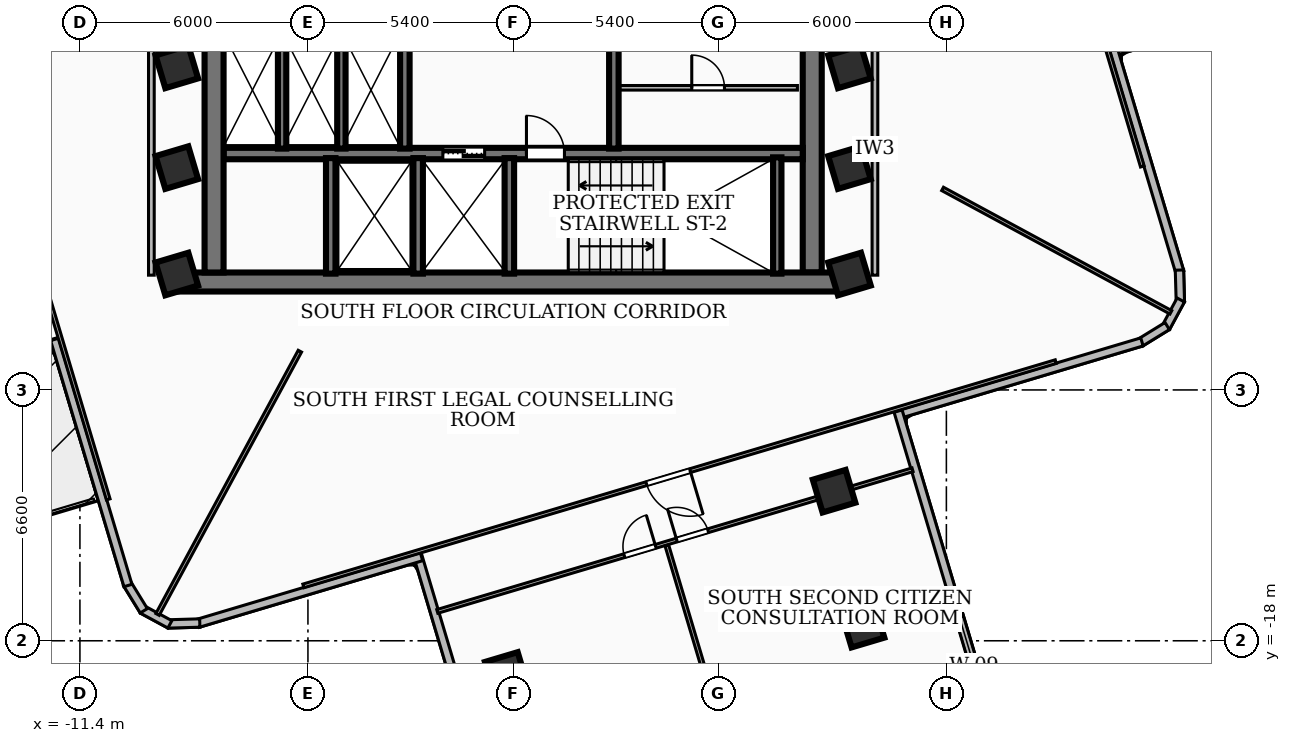
"""IFC4 building model, lengths in metres.
Left out: names, types, materials, properties, quantities, classifications, styles, units other than length and angle.
Written with IfcOpenShell. Run it as: python <this file> out.ifc"""

import sys

from ifc_helpers import new_model, si_unit, direction, frame, frame_2d, origin, origin_2d, place, context, subcontext, project, spatial, rectangle, extrude, element, fill, save


model = new_model("IFC4")
c1 = context("Model", 3, precision=1e-05, world=origin(), true_north=direction((0.0, 1.0)))
c2 = subcontext(c1, "Body", "Model", "MODEL_VIEW")
j1 = project(units=[si_unit("LENGTHUNIT", "METRE"), si_unit("PLANEANGLEUNIT", "RADIAN")], contexts=[c1])
p1 = place(None, origin())
s1 = spatial("IfcSite", under=j1, at=p1, CompositionType="ELEMENT")
p2 = place(p1, origin())
s2 = spatial("IfcBuilding", under=s1, at=p2, CompositionType="ELEMENT")
p3 = place(p2, frame((0.0, 0.0, 141.48)))
s3 = spatial("IfcBuildingStorey", under=s2, at=p3, CompositionType="ELEMENT", Elevation=141.48)
p4 = place(p3, frame((8.78, -8.56, 0.0), z_axis=(0.0, 0.0, 1.0), x_axis=(-1.0, 0.0, 0.0)))
e1 = element("IfcWall", 1, at=p4, inside=s3, PredefinedType="SHEAR", context=c2, shape_type="SweptSolid", body=[
    extrude(rectangle(XDim=17.56, YDim=0.5, at=frame_2d((8.78, 0.0))), origin(), (0.0, 0.0, 1.0), 3.32),
])
for number, where, z_axis, x_axis in (
    (2, (-7.87, -8.31, 0.0), (0.0, 0.0, 1.0), (0.0, 1.0, 0.0)),
    (3, (7.87, -2.0, 0.0), (0.0, 0.0, 1.0), (0.0, -1.0, 0.0)),
):
    element("IfcWall", number, at=place(p3, frame(where, z_axis=z_axis, x_axis=x_axis)), inside=s3, PredefinedType="SHEAR", context=c2, shape_type="SweptSolid", body=[
        extrude(rectangle(XDim=6.31, YDim=0.5, at=frame_2d((3.155, 0.0))), origin(), (0.0, 0.0, 1.0), 3.32),
    ])
p5 = place(p3, frame((-7.62, -5.18, 0.0), z_axis=(0.0, 0.0, 1.0), x_axis=(1.0, 0.0, 0.0)))
e4 = element("IfcWall", 4, at=p5, inside=s3, PredefinedType="SOLIDWALL", context=c2, shape_type="SweptSolid", body=[
    extrude(rectangle(XDim=15.24, YDim=0.3, at=frame_2d((7.62, 0.0))), origin(), (0.0, 0.0, 1.0), 3.32),
])
p6 = place(p5, frame((5.77, 0.0, 0.0)))
e5 = element("IfcOpeningElement", 5, at=p6, cuts=e4, PredefinedType="OPENING", context=c2, shape_type="SweptSolid", body=[
    extrude(rectangle(XDim=1.1, YDim=2.15, at=frame_2d((0.55, 1.075))), frame((0.0, 0.16, 0.0), z_axis=(0.0, -1.0, 0.0), x_axis=(1.0, 0.0, 0.0)), (0.0, 0.0, 1.0), 0.32),
])
p7 = place(p5, frame((7.97, 0.0, 0.0)))
e6 = element("IfcOpeningElement", 6, at=p7, cuts=e4, PredefinedType="OPENING", context=c2, shape_type="SweptSolid", body=[
    extrude(rectangle(XDim=1.0, YDim=2.1, at=frame_2d((0.5, 1.05))), frame((0.0, 0.16, 0.0), z_axis=(0.0, -1.0, 0.0), x_axis=(1.0, 0.0, 0.0)), (0.0, 0.0, 1.0), 0.32),
])
p8 = place(p3, frame((6.95, -8.34, 0.0), z_axis=(0.0, 0.0, 1.0), x_axis=(0.0, 1.0, 0.0)))
e7 = element("IfcWall", 7, at=p8, inside=s3, PredefinedType="SOLIDWALL", context=c2, shape_type="SweptSolid", body=[
    extrude(rectangle(XDim=3.06, YDim=0.22, at=frame_2d((1.53, 0.0))), origin(), (0.0, 0.0, 1.0), 3.32),
])
for number, where, z_axis, x_axis in (
    (8, (-0.1, -8.34, 0.0), (0.0, 0.0, 1.0), (0.0, 1.0, 0.0)),
    (9, (-2.5, -8.34, 0.0), (0.0, 0.0, 1.0), (0.0, 1.0, 0.0)),
    (10, (-4.8, -8.34, 0.0), (0.0, 0.0, 1.0), (0.0, 1.0, 0.0)),
):
    element("IfcWall", number, at=place(p3, frame(where, z_axis=z_axis, x_axis=x_axis)), inside=s3, PredefinedType="SOLIDWALL", context=c2, shape_type="SweptSolid", body=[
        extrude(rectangle(XDim=3.04, YDim=0.25, at=frame_2d((1.52, 0.0))), origin(), (0.0, 0.0, 1.0), 3.32),
    ])
for number, where, z_axis, x_axis in (
    (11, (-2.85, -5.05, 0.0), (0.0, 0.0, 1.0), (0.0, 1.0, 0.0)),
    (12, (2.65, -5.05, 0.0), (0.0, 0.0, 1.0), (0.0, 1.0, 0.0)),
):
    element("IfcWall", number, at=place(p3, frame(where, z_axis=z_axis, x_axis=x_axis)), inside=s3, PredefinedType="SOLIDWALL", context=c2, shape_type="SweptSolid", body=[
        extrude(rectangle(XDim=3.07, YDim=0.25, at=frame_2d((1.535, 0.0))), origin(), (0.0, 0.0, 1.0), 3.32),
    ])
for number, where, z_axis, x_axis in (
    (13, (-6.08, -5.05, 0.0), (0.0, 0.0, 1.0), (0.0, 1.0, 0.0)),
    (14, (-4.52, -5.05, 0.0), (0.0, 0.0, 1.0), (0.0, 1.0, 0.0)),
):
    element("IfcWall", number, at=place(p3, frame(where, z_axis=z_axis, x_axis=x_axis)), inside=s3, PredefinedType="SOLIDWALL", context=c2, shape_type="SweptSolid", body=[
        extrude(rectangle(XDim=3.07, YDim=0.22, at=frame_2d((1.535, 0.0))), origin(), (0.0, 0.0, 1.0), 3.32),
    ])
for number, where, z_axis, x_axis in (
    (15, (-8.85, -5.55, 0.0), (0.0, 0.0, 1.0), (0.958, 0.286, 0.0)),
    (16, (-8.85, -2.9, 0.0), (0.0, 0.0, 1.0), (0.958, 0.286, 0.0)),
    (17, (8.85, -5.55, 0.0), (0.0, 0.0, 1.0), (0.958, 0.286, 0.0)),
    (18, (8.85, -2.9, 0.0), (0.0, 0.0, 1.0), (0.958, 0.286, 0.0)),
    (19, (8.85, -8.35, 0.0), (0.0, 0.0, 1.0), (0.958, 0.286, 0.0)),
    (20, (-8.85, -8.35, 0.0), (0.0, 0.0, 1.0), (0.958, 0.286, 0.0)),
    (21, (-0.183, -18.86, 0.0), (0.0, 0.0, 1.0), (0.958, 0.286, 0.0)),
    (22, (8.445, -14.064, 0.0), (0.0, 0.0, 1.0), (0.958, 0.286, 0.0)),
    (23, (9.208, -17.615, 0.0), (0.0, 0.0, 1.0), (0.958, 0.286, 0.0)),
):
    element("IfcColumn", number, at=place(p3, frame(where, z_axis=z_axis, x_axis=x_axis)), inside=s3, PredefinedType="COLUMN", context=c2, shape_type="SweptSolid", body=[
        extrude(rectangle(XDim=0.9, YDim=0.9, at=origin_2d()), origin(), (0.0, 0.0, 1.0), 3.6),
    ])
p9 = place(p3, frame((-11.957, -10.129, 0.0), z_axis=(0.0, 0.0, 1.0), x_axis=(-0.958343962332, -0.285616613419, 0.0)))
e24 = element("IfcWall", 24, at=p9, inside=s3, PredefinedType="SOLIDWALL", context=c2, shape_type="SweptSolid", body=[
    extrude(rectangle(XDim=13.458, YDim=0.22, at=frame_2d((6.729, 0.0))), origin(), (0.0, 0.0, 1.0), 2.7),
])
p10 = place(p9, frame((5.0, 0.0, 0.0)))
e25 = element("IfcOpeningElement", 25, at=p10, cuts=e24, PredefinedType="OPENING", context=c2, shape_type="SweptSolid", body=[
    extrude(rectangle(XDim=1.1, YDim=2.1, at=frame_2d((0.55, 1.05))), frame((0.0, 0.12, 0.0), z_axis=(0.0, -1.0, 0.0), x_axis=(1.0, 0.0, 0.0)), (0.0, 0.0, 1.0), 0.24),
])
p11 = place(p3, frame((28.626, 1.323, 0.0), z_axis=(0.0, 0.0, 1.0), x_axis=(-0.958343962332, -0.285616613419, 0.0)))
e26 = element("IfcWall", 26, at=p11, inside=s3, PredefinedType="SOLIDWALL", context=c2, shape_type="SweptSolid", body=[
    extrude(rectangle(XDim=13.458, YDim=0.22, at=frame_2d((6.729, 0.0))), origin(), (0.0, 0.0, 1.0), 3.32),
])
p12 = place(p11, frame((0.85, 0.0, 0.85)))
e27 = element("IfcOpeningElement", 27, at=p12, cuts=e26, PredefinedType="OPENING", context=c2, shape_type="SweptSolid", body=[
    extrude(rectangle(XDim=1.5, YDim=1.8, at=frame_2d((0.75, 0.9))), frame((0.0, 0.12, 0.0), z_axis=(0.0, -1.0, 0.0), x_axis=(1.0, 0.0, 0.0)), (0.0, 0.0, 1.0), 0.24),
])
p13 = place(p3, frame((15.787, -2.412, 0.0), z_axis=(0.0, 0.0, 1.0), x_axis=(0.285712854037, -0.958315274342, 0.0)))
e28 = element("IfcWall", 28, at=p13, inside=s3, PredefinedType="SOLIDWALL", context=c2, shape_type="SweptSolid", body=[
    extrude(rectangle(XDim=6.139, YDim=0.22, at=frame_2d((3.069, 0.0))), origin(), (0.0, 0.0, 1.0), 3.32),
])
p14 = place(p3, frame((17.533, -8.246, 0.0), z_axis=(0.0, 0.0, 1.0), x_axis=(0.028676726094, -0.999588738122, 0.0)))
e29 = element("IfcWall", 29, at=p14, inside=s3, PredefinedType="SOLIDWALL", context=c2, shape_type="SweptSolid", body=[
    extrude(rectangle(XDim=0.834, YDim=0.22, at=frame_2d((0.417, 0.0))), origin(), (0.0, 0.0, 1.0), 3.32),
])
p15 = place(p3, frame((17.568, -9.033, 0.0), z_axis=(0.0, 0.0, 1.0), x_axis=(-0.475928115507, -0.879484183411, 0.0)))
e30 = element("IfcWall", 30, at=p15, inside=s3, PredefinedType="SOLIDWALL", context=c2, shape_type="SweptSolid", body=[
    extrude(rectangle(XDim=0.82, YDim=0.22, at=frame_2d((0.41, 0.0))), origin(), (0.0, 0.0, 1.0), 3.32),
])
p16 = place(p3, frame((17.211, -9.719, 0.0), z_axis=(0.0, 0.0, 1.0), x_axis=(-0.851597982144, -0.524195456684, 0.0)))
e31 = element("IfcWall", 31, at=p16, inside=s3, PredefinedType="SOLIDWALL", context=c2, shape_type="SweptSolid", body=[
    extrude(rectangle(XDim=0.834, YDim=0.22, at=frame_2d((0.417, 0.0))), origin(), (0.0, 0.0, 1.0), 3.32),
])
p17 = place(p3, frame((16.546, -10.136, 0.0), z_axis=(0.0, 0.0, 1.0), x_axis=(-0.958346765514, -0.285607207592, 0.0)))
e32 = element("IfcWall", 32, at=p17, inside=s3, PredefinedType="SOLIDWALL", context=c2, shape_type="SweptSolid", body=[
    extrude(rectangle(XDim=6.757, YDim=0.22, at=frame_2d((3.379, 0.0))), origin(), (0.0, 0.0, 1.0), 3.32),
])
p18 = place(p3, frame((10.129, -11.957, 0.0), z_axis=(0.0, 0.0, 1.0), x_axis=(0.285599672934, -0.958349010966, 0.0)))
e33 = element("IfcWall", 33, at=p18, inside=s3, PredefinedType="SOLIDWALL", context=c2, shape_type="SweptSolid", body=[
    extrude(rectangle(XDim=9.458, YDim=0.22, at=frame_2d((4.729, 0.0))), origin(), (0.0, 0.0, 1.0), 3.32),
])
p19 = place(p18, frame((5.658, 0.0, 0.85)))
e34 = element("IfcOpeningElement", 34, at=p19, cuts=e33, PredefinedType="OPENING", context=c2, shape_type="SweptSolid", body=[
    extrude(rectangle(XDim=2.7, YDim=1.65, at=frame_2d((1.35, 0.825))), frame((0.0, 0.12, 0.0), z_axis=(0.0, -1.0, 0.0), x_axis=(1.0, 0.0, 0.0)), (0.0, 0.0, 1.0), 0.24),
])
p20 = place(p3, frame((0.18, -24.792, 0.0), z_axis=(0.0, 0.0, 1.0), x_axis=(-0.28557596478, 0.958356075966, 0.0)))
e35 = element("IfcWall", 35, at=p20, inside=s3, PredefinedType="SOLIDWALL", context=c2, shape_type="SweptSolid", body=[
    extrude(rectangle(XDim=9.458, YDim=0.22, at=frame_2d((4.729, 0.0))), origin(), (0.0, 0.0, 1.0), 2.55),
])
p21 = place(p3, frame((-2.412, -15.787, 0.0), z_axis=(0.0, 0.0, 1.0), x_axis=(-0.958315274342, -0.285712854037, 0.0)))
e36 = element("IfcWall", 36, at=p21, inside=s3, PredefinedType="SOLIDWALL", context=c2, shape_type="SweptSolid", body=[
    extrude(rectangle(XDim=6.139, YDim=0.22, at=frame_2d((3.069, 0.0))), origin(), (0.0, 0.0, 1.0), 2.55),
])
p22 = place(p3, frame((-8.246, -17.533, 0.0), z_axis=(0.0, 0.0, 1.0), x_axis=(-0.999588738122, -0.028676726094, 0.0)))
e37 = element("IfcWall", 37, at=p22, inside=s3, PredefinedType="SOLIDWALL", context=c2, shape_type="SweptSolid", body=[
    extrude(rectangle(XDim=0.834, YDim=0.22, at=frame_2d((0.417, 0.0))), origin(), (0.0, 0.0, 1.0), 3.32),
])
p23 = place(p3, frame((-9.033, -17.568, 0.0), z_axis=(0.0, 0.0, 1.0), x_axis=(-0.879484183411, 0.475928115507, 0.0)))
e38 = element("IfcWall", 38, at=p23, inside=s3, PredefinedType="SOLIDWALL", context=c2, shape_type="SweptSolid", body=[
    extrude(rectangle(XDim=0.82, YDim=0.22, at=frame_2d((0.41, 0.0))), origin(), (0.0, 0.0, 1.0), 3.32),
])
p24 = place(p3, frame((-9.719, -17.211, 0.0), z_axis=(0.0, 0.0, 1.0), x_axis=(-0.524195456684, 0.851597982144, 0.0)))
e39 = element("IfcWall", 39, at=p24, inside=s3, PredefinedType="SOLIDWALL", context=c2, shape_type="SweptSolid", body=[
    extrude(rectangle(XDim=0.834, YDim=0.22, at=frame_2d((0.417, 0.0))), origin(), (0.0, 0.0, 1.0), 3.32),
])
p25 = place(p3, frame((-10.136, -16.546, 0.0), z_axis=(0.0, 0.0, 1.0), x_axis=(-0.285607207592, 0.958346765514, 0.0)))
e40 = element("IfcWall", 40, at=p25, inside=s3, PredefinedType="SOLIDWALL", context=c2, shape_type="SweptSolid", body=[
    extrude(rectangle(XDim=6.757, YDim=0.22, at=frame_2d((3.379, 0.0))), origin(), (0.0, 0.0, 1.0), 2.7),
])
p26 = place(p3, frame((2.8, -3.45, 0.0), z_axis=(0.0, 0.0, 1.0), x_axis=(1.0, 0.0, 0.0)))
e41 = element("IfcWall", 41, at=p26, inside=s3, PredefinedType="PARTITIONING", context=c2, shape_type="SweptSolid", body=[
    extrude(rectangle(XDim=4.68, YDim=0.12, at=frame_2d((2.34, 0.0))), origin(), (0.0, 0.0, 1.0), 3.32),
])
p27 = place(p26, frame((1.9, 0.0, 0.0)))
e42 = element("IfcOpeningElement", 42, at=p27, cuts=e41, PredefinedType="OPENING", context=c2, shape_type="SweptSolid", body=[
    extrude(rectangle(XDim=0.86, YDim=2.04, at=frame_2d((0.43, 1.02))), frame((0.0, 0.07, 0.0), z_axis=(0.0, -1.0, 0.0), x_axis=(1.0, 0.0, 0.0)), (0.0, 0.0, 1.0), 0.14),
])
for number, where, z_axis, x_axis in (
    (43, (-9.52, -8.38, 0.0), (0.0, 0.0, 1.0), (0.0, 1.0, 0.0)),
    (44, (9.52, -8.38, 0.0), (0.0, 0.0, 1.0), (0.0, 1.0, 0.0)),
):
    element("IfcWall", number, at=place(p3, frame(where, z_axis=z_axis, x_axis=x_axis)), inside=s3, PredefinedType="PARTITIONING", context=c2, shape_type="SweptSolid", body=[
        extrude(rectangle(XDim=6.63, YDim=0.15, at=frame_2d((3.315, 0.0))), origin(), (0.0, 0.0, 1.0), 2.55),
    ])
p28 = place(p3, frame((-5.612, -10.38, 0.0), z_axis=(0.0, 0.0, 1.0), x_axis=(-0.475666815962, -0.879625534073, 0.0)))
e45 = element("IfcWall", 45, at=p28, inside=s3, PredefinedType="PARTITIONING", context=c2, shape_type="SweptSolid", body=[
    extrude(rectangle(XDim=7.875, YDim=0.1, at=frame_2d((3.938, 0.0))), origin(), (0.0, 0.0, 1.0), 2.55),
])
p29 = place(p3, frame((11.3, -6.11, 0.0), z_axis=(0.0, 0.0, 1.0), x_axis=(0.879653556483, -0.475614991948, 0.0)))
e46 = element("IfcWall", 46, at=p29, inside=s3, PredefinedType="PARTITIONING", context=c2, shape_type="SweptSolid", body=[
    extrude(rectangle(XDim=6.829, YDim=0.1, at=frame_2d((3.414, 0.0))), origin(), (0.0, 0.0, 1.0), 3.32),
])
p30 = place(p3, frame((10.655, 14.279, 0.0), z_axis=(0.0, 0.0, 1.0), x_axis=(0.285665949025, -0.958329257389, 0.0)))
e47 = element("IfcWall", 47, at=p30, inside=s3, PredefinedType="PARTITIONING", context=c2, shape_type="SweptSolid", body=[
    extrude(rectangle(XDim=20.66, YDim=0.1, at=frame_2d((10.33, 0.0))), origin(), (0.0, 0.0, 1.0), 2.55),
])
p31 = place(p30, frame((10.04, 0.0, 0.0)))
e48 = element("IfcOpeningElement", 48, at=p31, cuts=e47, PredefinedType="OPENING", context=c2, shape_type="SweptSolid", body=[
    extrude(rectangle(XDim=1.2, YDim=2.1, at=frame_2d((0.6, 1.05))), frame((0.0, 0.06, 0.0), z_axis=(0.0, -1.0, 0.0), x_axis=(1.0, 0.0, 0.0)), (0.0, 0.0, 1.0), 0.12),
])
p32 = place(p3, frame((-10.655, -14.279, 0.0), z_axis=(0.0, 0.0, 1.0), x_axis=(-0.285665949025, 0.958329257389, 0.0)))
e49 = element("IfcWall", 49, at=p32, inside=s3, PredefinedType="PARTITIONING", context=c2, shape_type="SweptSolid", body=[
    extrude(rectangle(XDim=20.66, YDim=0.1, at=frame_2d((10.33, 0.0))), origin(), (0.0, 0.0, 1.0), 2.55),
])
p33 = place(p32, frame((10.04, 0.0, 0.0)))
e50 = element("IfcOpeningElement", 50, at=p33, cuts=e49, PredefinedType="OPENING", context=c2, shape_type="SweptSolid", body=[
    extrude(rectangle(XDim=1.2, YDim=2.1, at=frame_2d((0.6, 1.05))), frame((0.0, 0.06, 0.0), z_axis=(0.0, -1.0, 0.0), x_axis=(1.0, 0.0, 0.0)), (0.0, 0.0, 1.0), 0.12),
])
p34 = place(p3, frame((14.279, -10.655, 0.0), z_axis=(0.0, 0.0, 1.0), x_axis=(-0.958329257389, -0.285665949025, 0.0)))
e51 = element("IfcWall", 51, at=p34, inside=s3, PredefinedType="PARTITIONING", context=c2, shape_type="SweptSolid", body=[
    extrude(rectangle(XDim=20.66, YDim=0.1, at=frame_2d((10.33, 0.0))), origin(), (0.0, 0.0, 1.0), 2.55),
])
p35 = place(p34, frame((10.04, 0.0, 0.0)))
e52 = element("IfcOpeningElement", 52, at=p35, cuts=e51, PredefinedType="OPENING", context=c2, shape_type="SweptSolid", body=[
    extrude(rectangle(XDim=1.2, YDim=2.1, at=frame_2d((0.6, 1.05))), frame((0.0, 0.06, 0.0), z_axis=(0.0, -1.0, 0.0), x_axis=(1.0, 0.0, 0.0)), (0.0, 0.0, 1.0), 0.12),
])
p36 = place(p3, frame((4.044, -15.49, 0.0), z_axis=(0.0, 0.0, 1.0), x_axis=(0.285631393534, -0.95833955727, 0.0)))
e53 = element("IfcWall", 53, at=p36, inside=s3, PredefinedType="PARTITIONING", context=c2, shape_type="SweptSolid", body=[
    extrude(rectangle(XDim=9.215, YDim=0.1, at=frame_2d((4.607, 0.0))), origin(), (0.0, 0.0, 1.0), 2.812),
])
p37 = place(p3, frame((-1.996, -17.228, 0.0), z_axis=(0.0, 0.0, 1.0), x_axis=(0.958326854981, 0.285674008308, 0.0)))
e54 = element("IfcWall", 54, at=p37, inside=s3, PredefinedType="PARTITIONING", context=c2, shape_type="SweptSolid", body=[
    extrude(rectangle(XDim=13.05, YDim=0.1, at=frame_2d((6.525, 0.0))), origin(), (0.0, 0.0, 1.0), 2.55),
])
p38 = place(p37, frame((5.135, 0.0, 0.0)))
e55 = element("IfcOpeningElement", 55, at=p38, cuts=e54, PredefinedType="OPENING", context=c2, shape_type="SweptSolid", body=[
    extrude(rectangle(XDim=0.86, YDim=2.04, at=frame_2d((0.43, 1.02))), frame((0.0, 0.06, 0.0), z_axis=(0.0, -1.0, 0.0), x_axis=(1.0, 0.0, 0.0)), (0.0, 0.0, 1.0), 0.12),
])
p39 = place(p37, frame((6.575, 0.0, 0.0)))
e56 = element("IfcOpeningElement", 56, at=p39, cuts=e54, PredefinedType="OPENING", context=c2, shape_type="SweptSolid", body=[
    extrude(rectangle(XDim=0.86, YDim=2.04, at=frame_2d((0.43, 1.02))), frame((0.0, 0.06, 0.0), z_axis=(0.0, -1.0, 0.0), x_axis=(1.0, 0.0, 0.0)), (0.0, 0.0, 1.0), 0.12),
])
p40 = place(p19, origin())
e57 = element("IfcWindow", 57, at=p40, inside=s3, PartitioningType="SINGLE_PANEL", PredefinedType="WINDOW", context=c2, shape_type="SweptSolid", body=[
    extrude(rectangle(XDim=2.7, YDim=1.65, at=frame_2d((1.35, 0.825))), frame((0.0, 0.03, 0.0), z_axis=(0.0, -1.0, 0.0), x_axis=(1.0, 0.0, 0.0)), (0.0, 0.0, 1.0), 0.06),
])
fill(e34, e57)
p41 = place(p6, origin())
e58 = element("IfcDoor", 58, at=p41, inside=s3, OperationType="DOUBLE_DOOR_SLIDING", PredefinedType="DOOR", context=c2, shape_type="SweptSolid", body=[
    extrude(rectangle(XDim=1.1, YDim=2.15, at=frame_2d((0.55, 1.075))), frame((0.0, 0.025, 0.0), z_axis=(0.0, -1.0, 0.0), x_axis=(1.0, 0.0, 0.0)), (0.0, 0.0, 1.0), 0.05),
])
fill(e5, e58)
p42 = place(p7, origin())
e59 = element("IfcDoor", 59, at=p42, inside=s3, OperationType="SINGLE_SWING_LEFT", PredefinedType="DOOR", context=c2, shape_type="SweptSolid", body=[
    extrude(rectangle(XDim=1.0, YDim=2.1, at=frame_2d((0.5, 1.05))), frame((0.0, 0.025, 0.0), z_axis=(0.0, -1.0, 0.0), x_axis=(1.0, 0.0, 0.0)), (0.0, 0.0, 1.0), 0.05),
])
fill(e6, e59)
p43 = place(p27, origin())
e60 = element("IfcDoor", 60, at=p43, inside=s3, OperationType="SINGLE_SWING_LEFT", PredefinedType="DOOR", context=c2, shape_type="SweptSolid", body=[
    extrude(rectangle(XDim=0.86, YDim=2.04, at=frame_2d((0.43, 1.02))), frame((0.0, 0.025, 0.0), z_axis=(0.0, -1.0, 0.0), x_axis=(1.0, 0.0, 0.0)), (0.0, 0.0, 1.0), 0.05),
])
fill(e42, e60)
p44 = place(p35, origin())
e61 = element("IfcDoor", 61, at=p44, inside=s3, OperationType="SINGLE_SWING_LEFT", PredefinedType="DOOR", context=c2, shape_type="SweptSolid", body=[
    extrude(rectangle(XDim=1.2, YDim=2.1, at=frame_2d((0.6, 1.05))), frame((0.0, 0.025, 0.0), z_axis=(0.0, -1.0, 0.0), x_axis=(1.0, 0.0, 0.0)), (0.0, 0.0, 1.0), 0.05),
])
fill(e52, e61)
p45 = place(p38, origin())
e62 = element("IfcDoor", 62, at=p45, inside=s3, OperationType="SINGLE_SWING_RIGHT", PredefinedType="DOOR", context=c2, shape_type="SweptSolid", body=[
    extrude(rectangle(XDim=0.86, YDim=2.04, at=frame_2d((0.43, 1.02))), frame((0.0, 0.025, 0.0), z_axis=(0.0, -1.0, 0.0), x_axis=(1.0, 0.0, 0.0)), (0.0, 0.0, 1.0), 0.05),
])
fill(e55, e62)
p46 = place(p39, origin())
e63 = element("IfcDoor", 63, at=p46, inside=s3, OperationType="SINGLE_SWING_LEFT", PredefinedType="DOOR", context=c2, shape_type="SweptSolid", body=[
    extrude(rectangle(XDim=0.86, YDim=2.04, at=frame_2d((0.43, 1.02))), frame((0.0, 0.025, 0.0), z_axis=(0.0, -1.0, 0.0), x_axis=(1.0, 0.0, 0.0)), (0.0, 0.0, 1.0), 0.05),
])
fill(e56, e63)
save(model, sys.argv[1])
